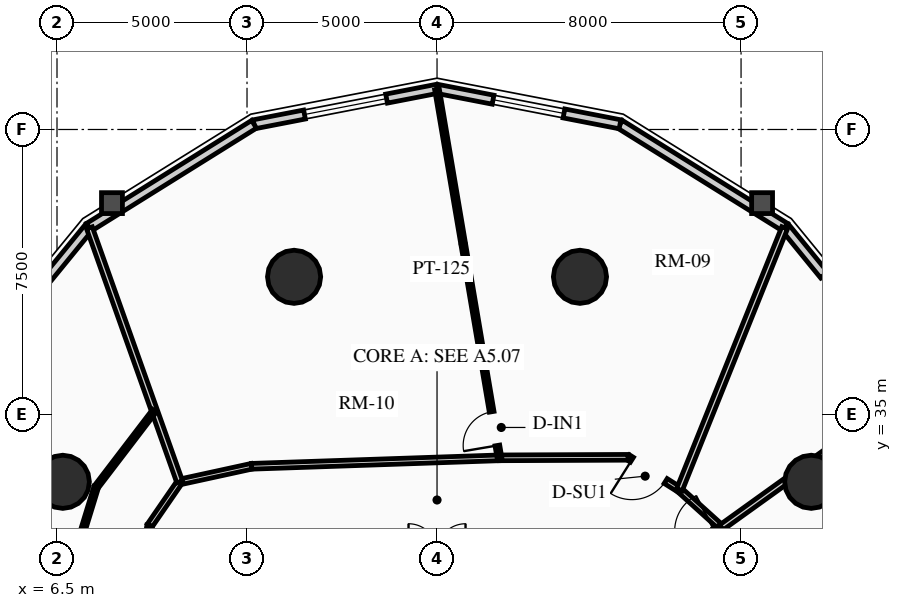
"""IFC4 building model, lengths in metres.
Left out: names, types, materials, properties, quantities, classifications, styles, units other than length and angle.
Written with IfcOpenShell. Run it as: python <this file> out.ifc"""

import sys

from ifc_helpers import new_model, si_unit, direction, frame, frame_2d, origin, origin_2d, place, context, subcontext, project, spatial, rectangle, circle, extrude, source, transform, mapped, element, fill, save


model = new_model("IFC4")
c1 = context("Model", 3, precision=1e-05, world=origin(), true_north=direction((0.0, 1.0)))
c2 = subcontext(c1, "Body", "Model", "MODEL_VIEW")
j1 = project(units=[si_unit("LENGTHUNIT", "METRE"), si_unit("PLANEANGLEUNIT", "RADIAN")], contexts=[c1])
p1 = place(None, origin())
s1 = spatial("IfcSite", under=j1, at=p1, CompositionType="ELEMENT")
p2 = place(p1, origin())
s2 = spatial("IfcBuilding", under=s1, at=p2, CompositionType="ELEMENT")
p3 = place(p2, frame((0.0, 0.0, 116.71)))
s3 = spatial("IfcBuildingStorey", under=s2, at=p3, CompositionType="ELEMENT", Elevation=116.71)
for number, where, z_axis, x_axis in (
    (1, (26.347, 33.229, 0.0), (0.0, 0.0, 1.0), (1.0, 0.0, 0.0)),
    (2, (20.261, 38.623, 0.0), (0.0, 0.0, 1.0), (1.0, 0.0, 0.0)),
    (3, (12.739, 38.623, 0.0), (0.0, 0.0, 1.0), (1.0, 0.0, 0.0)),
    (4, (6.653, 33.229, 0.0), (0.0, 0.0, 1.0), (1.0, 0.0, 0.0)),
):
    element("IfcColumn", number, at=place(p3, frame(where, z_axis=z_axis, x_axis=x_axis)), inside=s3, PredefinedType="USERDEFINED", context=c2, shape_type="SweptSolid", body=[
        extrude(circle(Radius=0.7, at=origin_2d()), origin(), (0.0, 0.0, 1.0), 2.91),
    ])
p4 = place(p3, frame((25.658, 39.928, 0.0), z_axis=(0.0, 0.0, 1.0), x_axis=(0.632700781152, -0.77439635945, 0.0)))
e5 = element("IfcWall", 5, at=p4, inside=s3, PredefinedType="SOLIDWALL", context=c2, shape_type="SweptSolid", body=[
    extrude(rectangle(XDim=5.448, YDim=0.24, at=frame_2d((2.724, 0.0))), origin(), (0.0, 0.0, 1.0), 2.179),
])
m1 = source(origin(), c2, "Body", "SweptSolid", [
    extrude(rectangle(XDim=2.2, YDim=1.35, at=frame_2d((1.1, 0.675))), frame((0.0, 0.13, 0.0), z_axis=(0.0, -1.0, 0.0), x_axis=(1.0, 0.0, 0.0)), (0.0, 0.0, 1.0), 0.26),
])
p5 = place(p4, frame((1.624, 0.0, 0.65)))
e6 = element("IfcOpeningElement", 6, at=p5, cuts=e5, PredefinedType="OPENING", context=c2, shape_type="MappedRepresentation", body=[
    mapped(m1, transform((0.0, 0.0, 0.0), x_axis=(1.0, 0.0, 0.0), y_axis=(0.0, 1.0, 0.0), z_axis=(0.0, 0.0, 1.0), scale=1.0)),
])
p6 = place(p3, frame((21.315, 42.637, 0.0), z_axis=(0.0, 0.0, 1.0), x_axis=(0.848520380187, -0.529162701263, 0.0)))
e7 = element("IfcWall", 7, at=p6, inside=s3, PredefinedType="SOLIDWALL", context=c2, shape_type="SweptSolid", body=[
    extrude(rectangle(XDim=5.119, YDim=0.24, at=frame_2d((2.56, 0.0))), origin(), (0.0, 0.0, 1.0), 2.179),
])
p7 = place(p3, frame((16.5, 43.57, 0.0), z_axis=(0.0, 0.0, 1.0), x_axis=(0.981723785992, -0.190311344954, 0.0)))
e8 = element("IfcWall", 8, at=p7, inside=s3, PredefinedType="SOLIDWALL", context=c2, shape_type="SweptSolid", body=[
    extrude(rectangle(XDim=4.904, YDim=0.24, at=frame_2d((2.452, 0.0))), origin(), (0.0, 0.0, 1.0), 2.179),
])
m2 = source(origin(), c2, "Body", "SweptSolid", [
    extrude(rectangle(XDim=1.9, YDim=1.35, at=frame_2d((0.95, 0.675))), frame((0.0, 0.13, 0.0), z_axis=(0.0, -1.0, 0.0), x_axis=(1.0, 0.0, 0.0)), (0.0, 0.0, 1.0), 0.26),
])
p8 = place(p7, frame((1.502, 0.0, 0.65)))
e9 = element("IfcOpeningElement", 9, at=p8, cuts=e8, PredefinedType="OPENING", context=c2, shape_type="MappedRepresentation", body=[
    mapped(m2, transform((0.0, 0.0, 0.0), x_axis=(1.0, 0.0, 0.0), y_axis=(0.0, 1.0, 0.0), z_axis=(0.0, 0.0, 1.0), scale=1.0)),
])
p9 = place(p3, frame((11.685, 42.637, 0.0), z_axis=(0.0, 0.0, 1.0), x_axis=(0.981723785992, 0.190311344954, 0.0)))
e10 = element("IfcWall", 10, at=p9, inside=s3, PredefinedType="SOLIDWALL", context=c2, shape_type="SweptSolid", body=[
    extrude(rectangle(XDim=4.904, YDim=0.24, at=frame_2d((2.452, 0.0))), origin(), (0.0, 0.0, 1.0), 2.179),
])
p10 = place(p9, frame((1.352, 0.0, 0.65)))
e11 = element("IfcOpeningElement", 11, at=p10, cuts=e10, PredefinedType="OPENING", context=c2, shape_type="MappedRepresentation", body=[
    mapped(m1, transform((0.0, 0.0, 0.0), x_axis=(1.0, 0.0, 0.0), y_axis=(0.0, 1.0, 0.0), z_axis=(0.0, 0.0, 1.0), scale=1.0)),
])
p11 = place(p3, frame((7.342, 39.928, 0.0), z_axis=(0.0, 0.0, 1.0), x_axis=(0.848520380187, 0.529162701263, 0.0)))
e12 = element("IfcWall", 12, at=p11, inside=s3, PredefinedType="SOLIDWALL", context=c2, shape_type="SweptSolid", body=[
    extrude(rectangle(XDim=5.119, YDim=0.24, at=frame_2d((2.56, 0.0))), origin(), (0.0, 0.0, 1.0), 2.179),
])
p12 = place(p3, frame((3.895, 35.709, 0.0), z_axis=(0.0, 0.0, 1.0), x_axis=(0.632700781152, 0.77439635945, 0.0)))
e13 = element("IfcWall", 13, at=p12, inside=s3, PredefinedType="SOLIDWALL", context=c2, shape_type="SweptSolid", body=[
    extrude(rectangle(XDim=5.448, YDim=0.24, at=frame_2d((2.724, 0.0))), origin(), (0.0, 0.0, 1.0), 2.179),
])
p13 = place(p12, frame((1.774, 0.0, 0.65)))
e14 = element("IfcOpeningElement", 14, at=p13, cuts=e13, PredefinedType="OPENING", context=c2, shape_type="MappedRepresentation", body=[
    mapped(m2, transform((0.0, 0.0, 0.0), x_axis=(1.0, 0.0, 0.0), y_axis=(0.0, 1.0, 0.0), z_axis=(0.0, 0.0, 1.0), scale=1.0)),
])
p14 = place(p3, frame((23.98, 32.027, 0.0), z_axis=(0.0, 0.0, 1.0), x_axis=(-0.742353224332, 0.670008724065, 0.0)))
e15 = element("IfcWall", 15, at=p14, inside=s3, PredefinedType="PARTITIONING", context=c2, shape_type="SweptSolid", body=[
    extrude(rectangle(XDim=1.485, YDim=0.15, at=frame_2d((0.742, 0.0))), origin(), (0.0, 0.0, 1.0), 2.225),
])
p15 = place(p3, frame((22.877, 33.022, 0.0), z_axis=(0.0, 0.0, 1.0), x_axis=(-0.845895608855, 0.533348496689, 0.0)))
e16 = element("IfcWall", 16, at=p15, inside=s3, PredefinedType="PARTITIONING", context=c2, shape_type="SweptSolid", body=[
    extrude(rectangle(XDim=1.597, YDim=0.15, at=frame_2d((0.798, 0.0))), origin(), (0.0, 0.0, 1.0), 2.225),
])
m3 = source(origin(), c2, "Body", "SweptSolid", [
    extrude(rectangle(XDim=1.05, YDim=2.015, at=frame_2d((0.525, 1.007))), frame((0.0, 0.085, 0.0), z_axis=(0.0, -1.0, 0.0), x_axis=(1.0, 0.0, 0.0)), (0.0, 0.0, 1.0), 0.17),
])
p16 = place(p15, frame((0.427, 0.0, 0.0)))
e17 = element("IfcOpeningElement", 17, at=p16, cuts=e16, PredefinedType="OPENING", context=c2, shape_type="MappedRepresentation", body=[
    mapped(m3, transform((0.0, 0.0, 0.0), x_axis=(1.0, 0.0, 0.0), y_axis=(0.0, 1.0, 0.0), z_axis=(0.0, 0.0, 1.0), scale=1.0)),
])
p17 = place(p3, frame((21.527, 33.873, 0.0), z_axis=(0.0, 0.0, 1.0), x_axis=(-0.999991838845, -0.004040079574, 0.0)))
e18 = element("IfcWall", 18, at=p17, inside=s3, PredefinedType="PARTITIONING", context=c2, shape_type="SweptSolid", body=[
    extrude(rectangle(XDim=3.384, YDim=0.15, at=frame_2d((1.692, 0.0))), origin(), (0.0, 0.0, 1.0), 2.225),
])
p18 = place(p3, frame((18.143, 33.86, 0.0), z_axis=(0.0, 0.0, 1.0), x_axis=(-0.999419208319, -0.034077060363, 0.0)))
e19 = element("IfcWall", 19, at=p18, inside=s3, PredefinedType="PARTITIONING", context=c2, shape_type="SweptSolid", body=[
    extrude(rectangle(XDim=6.527, YDim=0.15, at=frame_2d((3.263, 0.0))), origin(), (0.0, 0.0, 1.0), 2.225),
])
p19 = place(p3, frame((11.62, 33.637, 0.0), z_axis=(0.0, 0.0, 1.0), x_axis=(-0.97702579435, -0.213121085711, 0.0)))
e20 = element("IfcWall", 20, at=p19, inside=s3, PredefinedType="PARTITIONING", context=c2, shape_type="SweptSolid", body=[
    extrude(rectangle(XDim=1.935, YDim=0.15, at=frame_2d((0.967, 0.0))), origin(), (0.0, 0.0, 1.0), 2.225),
])
p20 = place(p3, frame((9.729, 33.225, 0.0), z_axis=(0.0, 0.0, 1.0), x_axis=(-0.567183649484, -0.82359134755, 0.0)))
e21 = element("IfcWall", 21, at=p20, inside=s3, PredefinedType="PARTITIONING", context=c2, shape_type="SweptSolid", body=[
    extrude(rectangle(XDim=1.392, YDim=0.15, at=frame_2d((0.696, 0.0))), origin(), (0.0, 0.0, 1.0), 2.225),
])
p21 = place(p3, frame((8.94, 32.078, 0.0), z_axis=(0.0, 0.0, 1.0), x_axis=(-0.159148467753, -0.98725466077, 0.0)))
e22 = element("IfcWall", 22, at=p21, inside=s3, PredefinedType="PARTITIONING", context=c2, shape_type="SweptSolid", body=[
    extrude(rectangle(XDim=1.554, YDim=0.15, at=frame_2d((0.777, 0.0))), origin(), (0.0, 0.0, 1.0), 2.225),
])
p22 = place(p3, frame((23.98, 32.027, 0.0), z_axis=(0.0, 0.0, 1.0), x_axis=(0.812162479031, 0.58343132214, 0.0)))
e23 = element("IfcWall", 23, at=p22, inside=s3, PredefinedType="PARTITIONING", context=c2, shape_type="SweptSolid", body=[
    extrude(rectangle(XDim=6.291, YDim=0.16, at=frame_2d((3.146, 0.0))), origin(), (0.0, 0.0, 1.0), 2.179),
])
p23 = place(p3, frame((22.877, 33.022, 0.0), z_axis=(0.0, 0.0, 1.0), x_axis=(0.372898022516, 0.927872332168, 0.0)))
e24 = element("IfcWall", 24, at=p23, inside=s3, PredefinedType="PARTITIONING", context=c2, shape_type="SweptSolid", body=[
    extrude(rectangle(XDim=7.426, YDim=0.16, at=frame_2d((3.713, 0.0))), origin(), (0.0, 0.0, 1.0), 2.179),
])
p24 = place(p3, frame((9.729, 33.225, 0.0), z_axis=(0.0, 0.0, 1.0), x_axis=(-0.334806049563, 0.942287063042, 0.0)))
e25 = element("IfcWall", 25, at=p24, inside=s3, PredefinedType="PARTITIONING", context=c2, shape_type="SweptSolid", body=[
    extrude(rectangle(XDim=7.097, YDim=0.16, at=frame_2d((3.548, 0.0))), origin(), (0.0, 0.0, 1.0), 2.179),
])
p25 = place(p3, frame((22.075, 31.025, 0.0), z_axis=(0.0, 0.0, 1.0), x_axis=(0.885026466958, 0.465540710125, 0.0)))
e26 = element("IfcWall", 26, at=p25, inside=s3, PredefinedType="PARTITIONING", context=c2, shape_type="SweptSolid", body=[
    extrude(rectangle(XDim=2.152, YDim=0.16, at=frame_2d((1.076, 0.0))), origin(), (0.0, 0.0, 1.0), 2.225),
])
m4 = source(origin(), c2, "Body", "SweptSolid", [
    extrude(rectangle(XDim=1.05, YDim=2.015, at=frame_2d((0.525, 1.007))), frame((0.0, 0.09, 0.0), z_axis=(0.0, -1.0, 0.0), x_axis=(1.0, 0.0, 0.0)), (0.0, 0.0, 1.0), 0.18),
])
p26 = place(p25, frame((0.902, 0.0, 0.0)))
e27 = element("IfcOpeningElement", 27, at=p26, cuts=e26, PredefinedType="OPENING", context=c2, shape_type="MappedRepresentation", body=[
    mapped(m4, transform((0.0, 0.0, 0.0), x_axis=(1.0, 0.0, 0.0), y_axis=(0.0, 1.0, 0.0), z_axis=(0.0, 0.0, 1.0), scale=1.0)),
])
p27 = place(p3, frame((18.143, 33.86, 0.0), z_axis=(0.0, 0.0, 1.0), x_axis=(-0.167145472003, 0.985932244725, 0.0)))
e28 = element("IfcWall", 28, at=p27, inside=s3, PredefinedType="PARTITIONING", context=c2, shape_type="SweptSolid", body=[
    extrude(rectangle(XDim=9.829, YDim=0.125, at=frame_2d((4.914, 0.0))), origin(), (0.0, 0.0, 1.0), 2.179),
])
m5 = source(origin(), c2, "Body", "SweptSolid", [
    extrude(rectangle(XDim=0.9, YDim=2.005, at=frame_2d((0.45, 1.002))), frame((0.0, 0.073, 0.0), z_axis=(0.0, -1.0, 0.0), x_axis=(1.0, 0.0, 0.0)), (0.0, 0.0, 1.0), 0.145),
])
p28 = place(p27, frame((0.33, 0.0, 0.0)))
e29 = element("IfcOpeningElement", 29, at=p28, cuts=e28, PredefinedType="OPENING", context=c2, shape_type="MappedRepresentation", body=[
    mapped(m5, transform((0.0, 0.0, 0.0), x_axis=(1.0, 0.0, 0.0), y_axis=(0.0, 1.0, 0.0), z_axis=(0.0, 0.0, 1.0), scale=1.0)),
])
p29 = place(p3, frame((9.064, 35.097, 0.0), z_axis=(0.0, 0.0, 1.0), x_axis=(-0.607126893664, -0.794604892377, 0.0)))
e30 = element("IfcWall", 30, at=p29, inside=s3, PredefinedType="PARTITIONING", context=c2, shape_type="SweptSolid", body=[
    extrude(rectangle(XDim=2.524, YDim=0.125, at=frame_2d((1.262, 0.0))), origin(), (0.0, 0.0, 1.0), 2.179),
])
p30 = place(p3, frame((7.532, 33.092, 0.0), z_axis=(0.0, 0.0, 1.0), x_axis=(-0.293965637063, -0.955815988685, 0.0)))
e31 = element("IfcWall", 31, at=p30, inside=s3, PredefinedType="PARTITIONING", context=c2, shape_type="SweptSolid", body=[
    extrude(rectangle(XDim=2.712, YDim=0.125, at=frame_2d((1.356, 0.0))), origin(), (0.0, 0.0, 1.0), 2.225),
])
m6 = source(origin(), c2, "Body", "SweptSolid", [
    extrude(rectangle(XDim=1.9, YDim=1.35, at=frame_2d((0.95, 0.675))), frame((0.0, 0.03, 0.0), z_axis=(0.0, -1.0, 0.0), x_axis=(1.0, 0.0, 0.0)), (0.0, 0.0, 1.0), 0.06),
])
p31 = place(p8, origin())
e32 = element("IfcWindow", 32, at=p31, inside=s3, PartitioningType="DOUBLE_PANEL_VERTICAL", PredefinedType="WINDOW", context=c2, shape_type="MappedRepresentation", body=[
    mapped(m6, transform((0.0, 0.0, 0.0), x_axis=(1.0, 0.0, 0.0), y_axis=(0.0, 1.0, 0.0), z_axis=(0.0, 0.0, 1.0), scale=1.0)),
])
fill(e9, e32)
m7 = source(origin(), c2, "Body", "SweptSolid", [
    extrude(rectangle(XDim=2.2, YDim=1.35, at=frame_2d((1.1, 0.675))), frame((0.0, 0.03, 0.0), z_axis=(0.0, -1.0, 0.0), x_axis=(1.0, 0.0, 0.0)), (0.0, 0.0, 1.0), 0.06),
])
p32 = place(p10, origin())
e33 = element("IfcWindow", 33, at=p32, inside=s3, PartitioningType="DOUBLE_PANEL_VERTICAL", PredefinedType="WINDOW", context=c2, shape_type="MappedRepresentation", body=[
    mapped(m7, transform((0.0, 0.0, 0.0), x_axis=(1.0, 0.0, 0.0), y_axis=(0.0, 1.0, 0.0), z_axis=(0.0, 0.0, 1.0), scale=1.0)),
])
fill(e11, e33)
m8 = source(origin(), c2, "Body", "SweptSolid", [
    extrude(rectangle(XDim=1.05, YDim=2.015, at=frame_2d((0.525, 1.007))), frame((0.0, 0.025, 0.0), z_axis=(0.0, -1.0, 0.0), x_axis=(1.0, 0.0, 0.0)), (0.0, 0.0, 1.0), 0.05),
])
p33 = place(p16, origin())
e34 = element("IfcDoor", 34, at=p33, inside=s3, OperationType="SINGLE_SWING_RIGHT", PredefinedType="DOOR", context=c2, shape_type="MappedRepresentation", body=[
    mapped(m8, transform((0.0, 0.0, 0.0), x_axis=(1.0, 0.0, 0.0), y_axis=(0.0, 1.0, 0.0), z_axis=(0.0, 0.0, 1.0), scale=1.0)),
])
fill(e17, e34)
m9 = source(origin(), c2, "Body", "SweptSolid", [
    extrude(rectangle(XDim=0.9, YDim=2.005, at=frame_2d((0.45, 1.002))), frame((0.0, 0.025, 0.0), z_axis=(0.0, -1.0, 0.0), x_axis=(1.0, 0.0, 0.0)), (0.0, 0.0, 1.0), 0.05),
])
p34 = place(p28, origin())
e35 = element("IfcDoor", 35, at=p34, inside=s3, OperationType="SINGLE_SWING_LEFT", PredefinedType="DOOR", context=c2, shape_type="MappedRepresentation", body=[
    mapped(m9, transform((0.0, 0.0, 0.0), x_axis=(1.0, 0.0, 0.0), y_axis=(0.0, 1.0, 0.0), z_axis=(0.0, 0.0, 1.0), scale=1.0)),
])
fill(e29, e35)
save(model, sys.argv[1])
